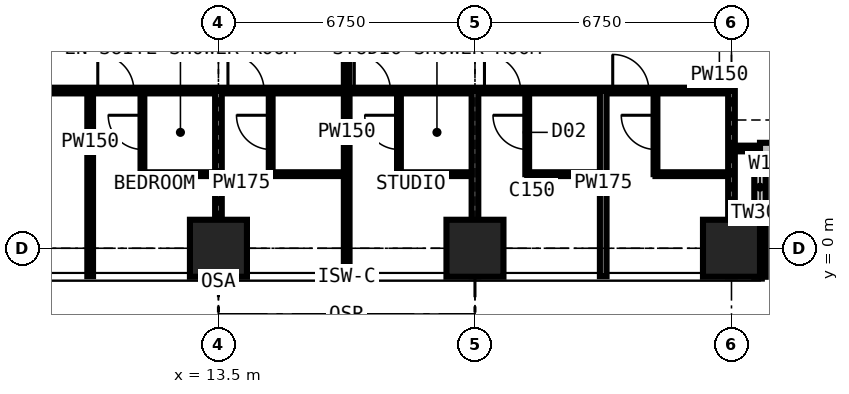
"""IFC4 building model, lengths in metres.
Left out: names, types, materials, properties, quantities, classifications, styles, units other than length and angle.
Written with IfcOpenShell. Run it as: python <this file> out.ifc"""

import sys

from ifc_helpers import new_model, si_unit, direction, frame, frame_2d, origin, origin_2d, place, context, subcontext, project, spatial, rectangle, extrude, element, fill, save


model = new_model("IFC4")
c1 = context("Model", 3, precision=1e-05, world=origin(), true_north=direction((0.0, 1.0)))
c2 = subcontext(c1, "Body", "Model", "MODEL_VIEW")
j1 = project(units=[si_unit("LENGTHUNIT", "METRE"), si_unit("PLANEANGLEUNIT", "RADIAN")], contexts=[c1])
p1 = place(None, origin())
s1 = spatial("IfcSite", under=j1, at=p1, CompositionType="ELEMENT")
p2 = place(p1, origin())
s2 = spatial("IfcBuilding", under=s1, at=p2, CompositionType="ELEMENT")
p3 = place(p2, frame((0.0, 0.0, 160.2)))
s3 = spatial("IfcBuildingStorey", under=s2, at=p3, CompositionType="ELEMENT", Elevation=160.2)
for number, where, z_axis, x_axis in (
    (1, (13.5, 0.0, 0.0), (0.0, 0.0, 1.0), (1.0, 0.0, 0.0)),
    (2, (20.25, 0.0, 0.0), (0.0, 0.0, 1.0), (1.0, 0.0, 0.0)),
    (3, (27.0, 0.0, 0.0), (0.0, 0.0, 1.0), (1.0, 0.0, 0.0)),
):
    element("IfcColumn", number, at=place(p3, frame(where, z_axis=z_axis, x_axis=x_axis)), inside=s3, PredefinedType="COLUMN", context=c2, shape_type="SweptSolid", body=[
        extrude(rectangle(XDim=1.5, YDim=1.5, at=origin_2d()), origin(), (0.0, 0.0, 1.0), 3.6),
    ])
p4 = place(p3, frame((27.75, -0.75, 0.0), z_axis=(0.0, 0.0, 1.0), x_axis=(0.0, 1.0, 0.0)))
e4 = element("IfcWall", 4, at=p4, inside=s3, PredefinedType="SOLIDWALL", context=c2, shape_type="SweptSolid", body=[
    extrude(rectangle(XDim=3.375, YDim=0.3, at=frame_2d((1.688, 0.0))), origin(), (0.0, 0.0, 1.0), 3.375),
])
p5 = place(p4, frame((1.607, 0.0, 0.9)))
e5 = element("IfcOpeningElement", 5, at=p5, cuts=e4, PredefinedType="OPENING", context=c2, shape_type="SweptSolid", body=[
    extrude(rectangle(XDim=1.5, YDim=1.8, at=frame_2d((0.75, 0.9))), frame((0.0, 0.16, 0.0), z_axis=(0.0, -1.0, 0.0), x_axis=(1.0, 0.0, 0.0)), (0.0, 0.0, 1.0), 0.32),
])
p6 = place(p3, frame((27.75, 2.625, 0.0), z_axis=(0.0, 0.0, 1.0), x_axis=(1.0, 0.0, 0.0)))
e6 = element("IfcWall", 6, at=p6, inside=s3, PredefinedType="SOLIDWALL", context=c2, shape_type="SweptSolid", body=[
    extrude(rectangle(XDim=3.375, YDim=0.3, at=frame_2d((1.688, 0.0))), origin(), (0.0, 0.0, 1.0), 3.375),
])
p7 = place(p6, frame((0.788, 0.0, 0.6)))
e7 = element("IfcOpeningElement", 7, at=p7, cuts=e6, PredefinedType="OPENING", context=c2, shape_type="SweptSolid", body=[
    extrude(rectangle(XDim=1.8, YDim=2.1, at=frame_2d((0.9, 1.05))), frame((0.0, 0.16, 0.0), z_axis=(0.0, -1.0, 0.0), x_axis=(1.0, 0.0, 0.0)), (0.0, 0.0, 1.0), 0.32),
])
p8 = place(p3, frame((6.75, 4.15, 0.0), z_axis=(0.0, 0.0, 1.0), x_axis=(1.0, 0.0, 0.0)))
e8 = element("IfcWall", 8, at=p8, inside=s3, PredefinedType="PARTITIONING", context=c2, shape_type="SweptSolid", body=[
    extrude(rectangle(XDim=20.25, YDim=0.15, at=frame_2d((10.125, 0.0))), origin(), (0.0, 0.0, 1.0), 3.375),
])
p9 = place(p8, frame((1.2, 0.0, 0.0)))
e9 = element("IfcOpeningElement", 9, at=p9, cuts=e8, PredefinedType="OPENING", context=c2, shape_type="SweptSolid", body=[
    extrude(rectangle(XDim=1.0, YDim=2.2, at=frame_2d((0.5, 1.1))), frame((0.0, 0.085, 0.0), z_axis=(0.0, -1.0, 0.0), x_axis=(1.0, 0.0, 0.0)), (0.0, 0.0, 1.0), 0.17),
])
p10 = place(p8, frame((3.575, 0.0, 0.0)))
e10 = element("IfcOpeningElement", 10, at=p10, cuts=e8, PredefinedType="OPENING", context=c2, shape_type="SweptSolid", body=[
    extrude(rectangle(XDim=0.95, YDim=2.2, at=frame_2d((0.475, 1.1))), frame((0.0, 0.085, 0.0), z_axis=(0.0, -1.0, 0.0), x_axis=(1.0, 0.0, 0.0)), (0.0, 0.0, 1.0), 0.17),
])
p11 = place(p8, frame((7.0, 0.0, 0.0)))
e11 = element("IfcOpeningElement", 11, at=p11, cuts=e8, PredefinedType="OPENING", context=c2, shape_type="SweptSolid", body=[
    extrude(rectangle(XDim=0.95, YDim=2.2, at=frame_2d((0.475, 1.1))), frame((0.0, 0.085, 0.0), z_axis=(0.0, -1.0, 0.0), x_axis=(1.0, 0.0, 0.0)), (0.0, 0.0, 1.0), 0.17),
])
p12 = place(p8, frame((10.325, 0.0, 0.0)))
e12 = element("IfcOpeningElement", 12, at=p12, cuts=e8, PredefinedType="OPENING", context=c2, shape_type="SweptSolid", body=[
    extrude(rectangle(XDim=0.95, YDim=2.2, at=frame_2d((0.475, 1.1))), frame((0.0, 0.085, 0.0), z_axis=(0.0, -1.0, 0.0), x_axis=(1.0, 0.0, 0.0)), (0.0, 0.0, 1.0), 0.17),
])
p13 = place(p8, frame((13.75, 0.0, 0.0)))
e13 = element("IfcOpeningElement", 13, at=p13, cuts=e8, PredefinedType="OPENING", context=c2, shape_type="SweptSolid", body=[
    extrude(rectangle(XDim=0.95, YDim=2.2, at=frame_2d((0.475, 1.1))), frame((0.0, 0.085, 0.0), z_axis=(0.0, -1.0, 0.0), x_axis=(1.0, 0.0, 0.0)), (0.0, 0.0, 1.0), 0.17),
])
p14 = place(p8, frame((17.125, 0.0, 0.0)))
e14 = element("IfcOpeningElement", 14, at=p14, cuts=e8, PredefinedType="OPENING", context=c2, shape_type="SweptSolid", body=[
    extrude(rectangle(XDim=0.95, YDim=2.2, at=frame_2d((0.475, 1.1))), frame((0.0, 0.085, 0.0), z_axis=(0.0, -1.0, 0.0), x_axis=(1.0, 0.0, 0.0)), (0.0, 0.0, 1.0), 0.17),
])
p15 = place(p3, frame((10.125, -0.734, 0.0), z_axis=(0.0, 0.0, 1.0), x_axis=(0.0, 1.0, 0.0)))
e15 = element("IfcWall", 15, at=p15, inside=s3, PredefinedType="PARTITIONING", context=c2, shape_type="SweptSolid", body=[
    extrude(rectangle(XDim=4.884, YDim=0.15, at=frame_2d((2.442, 0.0))), origin(), (0.0, 0.0, 1.0), 3.375),
])
p16 = place(p3, frame((11.5, 1.95, 0.0), z_axis=(0.0, 0.0, 1.0), x_axis=(0.0, 1.0, 0.0)))
e16 = element("IfcWall", 16, at=p16, inside=s3, PredefinedType="PARTITIONING", context=c2, shape_type="SweptSolid", body=[
    extrude(rectangle(XDim=2.2, YDim=0.1, at=frame_2d((1.1, 0.0))), origin(), (0.0, 0.0, 1.0), 3.375),
])
p17 = place(p16, frame((0.65, 0.0, 0.0)))
e17 = element("IfcOpeningElement", 17, at=p17, cuts=e16, PredefinedType="OPENING", context=c2, shape_type="SweptSolid", body=[
    extrude(rectangle(XDim=0.9, YDim=2.2, at=frame_2d((0.45, 1.1))), frame((0.0, 0.06, 0.0), z_axis=(0.0, -1.0, 0.0), x_axis=(1.0, 0.0, 0.0)), (0.0, 0.0, 1.0), 0.12),
])
p18 = place(p3, frame((11.5, 1.95, 0.0), z_axis=(0.0, 0.0, 1.0), x_axis=(1.0, 0.0, 0.0)))
e18 = element("IfcWall", 18, at=p18, inside=s3, PredefinedType="PARTITIONING", context=c2, shape_type="SweptSolid", body=[
    extrude(rectangle(XDim=2.0, YDim=0.1, at=frame_2d((1.0, 0.0))), origin(), (0.0, 0.0, 1.0), 3.375),
])
p19 = place(p3, frame((13.5, -0.734, 0.0), z_axis=(0.0, 0.0, 1.0), x_axis=(0.0, 1.0, 0.0)))
e19 = element("IfcWall", 19, at=p19, inside=s3, PredefinedType="PARTITIONING", context=c2, shape_type="SweptSolid", body=[
    extrude(rectangle(XDim=4.884, YDim=0.175, at=frame_2d((2.442, 0.0))), origin(), (0.0, 0.0, 1.0), 2.61),
])
p20 = place(p3, frame((14.875, 1.95, 0.0), z_axis=(0.0, 0.0, 1.0), x_axis=(0.0, 1.0, 0.0)))
e20 = element("IfcWall", 20, at=p20, inside=s3, PredefinedType="PARTITIONING", context=c2, shape_type="SweptSolid", body=[
    extrude(rectangle(XDim=2.2, YDim=0.1, at=frame_2d((1.1, 0.0))), origin(), (0.0, 0.0, 1.0), 3.375),
])
p21 = place(p20, frame((0.65, 0.0, 0.0)))
e21 = element("IfcOpeningElement", 21, at=p21, cuts=e20, PredefinedType="OPENING", context=c2, shape_type="SweptSolid", body=[
    extrude(rectangle(XDim=0.9, YDim=2.2, at=frame_2d((0.45, 1.1))), frame((0.0, 0.06, 0.0), z_axis=(0.0, -1.0, 0.0), x_axis=(1.0, 0.0, 0.0)), (0.0, 0.0, 1.0), 0.12),
])
p22 = place(p3, frame((14.875, 1.95, 0.0), z_axis=(0.0, 0.0, 1.0), x_axis=(1.0, 0.0, 0.0)))
e22 = element("IfcWall", 22, at=p22, inside=s3, PredefinedType="PARTITIONING", context=c2, shape_type="SweptSolid", body=[
    extrude(rectangle(XDim=2.0, YDim=0.1, at=frame_2d((1.0, 0.0))), origin(), (0.0, 0.0, 1.0), 3.375),
])
p23 = place(p3, frame((16.875, -0.734, 0.0), z_axis=(0.0, 0.0, 1.0), x_axis=(0.0, 1.0, 0.0)))
e23 = element("IfcWall", 23, at=p23, inside=s3, PredefinedType="PARTITIONING", context=c2, shape_type="SweptSolid", body=[
    extrude(rectangle(XDim=12.034, YDim=0.15, at=frame_2d((6.017, 0.0))), origin(), (0.0, 0.0, 1.0), 3.375),
])
p24 = place(p3, frame((18.25, 1.95, 0.0), z_axis=(0.0, 0.0, 1.0), x_axis=(0.0, 1.0, 0.0)))
e24 = element("IfcWall", 24, at=p24, inside=s3, PredefinedType="PARTITIONING", context=c2, shape_type="SweptSolid", body=[
    extrude(rectangle(XDim=2.2, YDim=0.1, at=frame_2d((1.1, 0.0))), origin(), (0.0, 0.0, 1.0), 3.375),
])
p25 = place(p24, frame((0.65, 0.0, 0.0)))
e25 = element("IfcOpeningElement", 25, at=p25, cuts=e24, PredefinedType="OPENING", context=c2, shape_type="SweptSolid", body=[
    extrude(rectangle(XDim=0.9, YDim=2.2, at=frame_2d((0.45, 1.1))), frame((0.0, 0.06, 0.0), z_axis=(0.0, -1.0, 0.0), x_axis=(1.0, 0.0, 0.0)), (0.0, 0.0, 1.0), 0.12),
])
p26 = place(p3, frame((18.25, 1.95, 0.0), z_axis=(0.0, 0.0, 1.0), x_axis=(1.0, 0.0, 0.0)))
e26 = element("IfcWall", 26, at=p26, inside=s3, PredefinedType="PARTITIONING", context=c2, shape_type="SweptSolid", body=[
    extrude(rectangle(XDim=2.0, YDim=0.1, at=frame_2d((1.0, 0.0))), origin(), (0.0, 0.0, 1.0), 3.375),
])
p27 = place(p3, frame((20.25, -0.734, 0.0), z_axis=(0.0, 0.0, 1.0), x_axis=(0.0, 1.0, 0.0)))
e27 = element("IfcWall", 27, at=p27, inside=s3, PredefinedType="PARTITIONING", context=c2, shape_type="SweptSolid", body=[
    extrude(rectangle(XDim=4.884, YDim=0.175, at=frame_2d((2.442, 0.0))), origin(), (0.0, 0.0, 1.0), 2.61),
])
p28 = place(p3, frame((21.625, 1.95, 0.0), z_axis=(0.0, 0.0, 1.0), x_axis=(0.0, 1.0, 0.0)))
e28 = element("IfcWall", 28, at=p28, inside=s3, PredefinedType="PARTITIONING", context=c2, shape_type="SweptSolid", body=[
    extrude(rectangle(XDim=2.2, YDim=0.1, at=frame_2d((1.1, 0.0))), origin(), (0.0, 0.0, 1.0), 3.375),
])
p29 = place(p28, frame((0.65, 0.0, 0.0)))
e29 = element("IfcOpeningElement", 29, at=p29, cuts=e28, PredefinedType="OPENING", context=c2, shape_type="SweptSolid", body=[
    extrude(rectangle(XDim=0.9, YDim=2.2, at=frame_2d((0.45, 1.1))), frame((0.0, 0.06, 0.0), z_axis=(0.0, -1.0, 0.0), x_axis=(1.0, 0.0, 0.0)), (0.0, 0.0, 1.0), 0.12),
])
p30 = place(p3, frame((21.625, 1.95, 0.0), z_axis=(0.0, 0.0, 1.0), x_axis=(1.0, 0.0, 0.0)))
e30 = element("IfcWall", 30, at=p30, inside=s3, PredefinedType="PARTITIONING", context=c2, shape_type="SweptSolid", body=[
    extrude(rectangle(XDim=2.0, YDim=0.1, at=frame_2d((1.0, 0.0))), origin(), (0.0, 0.0, 1.0), 3.375),
])
p31 = place(p3, frame((23.625, -0.734, 0.0), z_axis=(0.0, 0.0, 1.0), x_axis=(0.0, 1.0, 0.0)))
e31 = element("IfcWall", 31, at=p31, inside=s3, PredefinedType="PARTITIONING", context=c2, shape_type="SweptSolid", body=[
    extrude(rectangle(XDim=4.884, YDim=0.175, at=frame_2d((2.442, 0.0))), origin(), (0.0, 0.0, 1.0), 3.375),
])
p32 = place(p3, frame((25.0, 1.95, 0.0), z_axis=(0.0, 0.0, 1.0), x_axis=(0.0, 1.0, 0.0)))
e32 = element("IfcWall", 32, at=p32, inside=s3, PredefinedType="PARTITIONING", context=c2, shape_type="SweptSolid", body=[
    extrude(rectangle(XDim=2.2, YDim=0.1, at=frame_2d((1.1, 0.0))), origin(), (0.0, 0.0, 1.0), 3.375),
])
p33 = place(p32, frame((0.65, 0.0, 0.0)))
e33 = element("IfcOpeningElement", 33, at=p33, cuts=e32, PredefinedType="OPENING", context=c2, shape_type="SweptSolid", body=[
    extrude(rectangle(XDim=0.9, YDim=2.2, at=frame_2d((0.45, 1.1))), frame((0.0, 0.06, 0.0), z_axis=(0.0, -1.0, 0.0), x_axis=(1.0, 0.0, 0.0)), (0.0, 0.0, 1.0), 0.12),
])
p34 = place(p3, frame((25.0, 1.95, 0.0), z_axis=(0.0, 0.0, 1.0), x_axis=(1.0, 0.0, 0.0)))
e34 = element("IfcWall", 34, at=p34, inside=s3, PredefinedType="PARTITIONING", context=c2, shape_type="SweptSolid", body=[
    extrude(rectangle(XDim=2.0, YDim=0.1, at=frame_2d((1.0, 0.0))), origin(), (0.0, 0.0, 1.0), 3.375),
])
p35 = place(p3, frame((27.0, -0.734, 0.0), z_axis=(0.0, 0.0, 1.0), x_axis=(0.0, 1.0, 0.0)))
e35 = element("IfcWall", 35, at=p35, inside=s3, PredefinedType="PARTITIONING", context=c2, shape_type="SweptSolid", body=[
    extrude(rectangle(XDim=4.884, YDim=0.175, at=frame_2d((2.442, 0.0))), origin(), (0.0, 0.0, 1.0), 2.877),
])
p36 = place(p3, frame((27.0, 2.625, 0.0), z_axis=(0.0, 0.0, 1.0), x_axis=(1.0, 0.0, 0.0)))
e36 = element("IfcWall", 36, at=p36, inside=s3, PredefinedType="PARTITIONING", context=c2, shape_type="SweptSolid", body=[
    extrude(rectangle(XDim=0.734, YDim=0.15, at=frame_2d((0.367, 0.0))), origin(), (0.0, 0.0, 1.0), 3.375),
])
p37 = place(p5, origin())
e37 = element("IfcWindow", 37, at=p37, inside=s3, PartitioningType="SINGLE_PANEL", PredefinedType="WINDOW", context=c2, shape_type="SweptSolid", body=[
    extrude(rectangle(XDim=1.5, YDim=1.8, at=frame_2d((0.75, 0.9))), frame((0.0, 0.03, 0.0), z_axis=(0.0, -1.0, 0.0), x_axis=(1.0, 0.0, 0.0)), (0.0, 0.0, 1.0), 0.06),
])
fill(e5, e37)
p38 = place(p10, origin())
e38 = element("IfcDoor", 38, at=p38, inside=s3, OperationType="SINGLE_SWING_LEFT", PredefinedType="DOOR", context=c2, shape_type="SweptSolid", body=[
    extrude(rectangle(XDim=0.95, YDim=2.2, at=frame_2d((0.475, 1.1))), frame((0.0, 0.025, 0.0), z_axis=(0.0, -1.0, 0.0), x_axis=(1.0, 0.0, 0.0)), (0.0, 0.0, 1.0), 0.05),
])
fill(e10, e38)
p39 = place(p17, origin())
e39 = element("IfcDoor", 39, at=p39, inside=s3, OperationType="SINGLE_SWING_RIGHT", PredefinedType="DOOR", context=c2, shape_type="SweptSolid", body=[
    extrude(rectangle(XDim=0.9, YDim=2.2, at=frame_2d((0.45, 1.1))), frame((0.0, 0.025, 0.0), z_axis=(0.0, -1.0, 0.0), x_axis=(1.0, 0.0, 0.0)), (0.0, 0.0, 1.0), 0.05),
])
fill(e17, e39)
p40 = place(p11, origin())
e40 = element("IfcDoor", 40, at=p40, inside=s3, OperationType="SINGLE_SWING_LEFT", PredefinedType="DOOR", context=c2, shape_type="SweptSolid", body=[
    extrude(rectangle(XDim=0.95, YDim=2.2, at=frame_2d((0.475, 1.1))), frame((0.0, 0.025, 0.0), z_axis=(0.0, -1.0, 0.0), x_axis=(1.0, 0.0, 0.0)), (0.0, 0.0, 1.0), 0.05),
])
fill(e11, e40)
p41 = place(p21, origin())
e41 = element("IfcDoor", 41, at=p41, inside=s3, OperationType="SINGLE_SWING_RIGHT", PredefinedType="DOOR", context=c2, shape_type="SweptSolid", body=[
    extrude(rectangle(XDim=0.9, YDim=2.2, at=frame_2d((0.45, 1.1))), frame((0.0, 0.025, 0.0), z_axis=(0.0, -1.0, 0.0), x_axis=(1.0, 0.0, 0.0)), (0.0, 0.0, 1.0), 0.05),
])
fill(e21, e41)
p42 = place(p12, origin())
e42 = element("IfcDoor", 42, at=p42, inside=s3, OperationType="SINGLE_SWING_LEFT", PredefinedType="DOOR", context=c2, shape_type="SweptSolid", body=[
    extrude(rectangle(XDim=0.95, YDim=2.2, at=frame_2d((0.475, 1.1))), frame((0.0, 0.025, 0.0), z_axis=(0.0, -1.0, 0.0), x_axis=(1.0, 0.0, 0.0)), (0.0, 0.0, 1.0), 0.05),
])
fill(e12, e42)
p43 = place(p25, origin())
e43 = element("IfcDoor", 43, at=p43, inside=s3, OperationType="SINGLE_SWING_RIGHT", PredefinedType="DOOR", context=c2, shape_type="SweptSolid", body=[
    extrude(rectangle(XDim=0.9, YDim=2.2, at=frame_2d((0.45, 1.1))), frame((0.0, 0.025, 0.0), z_axis=(0.0, -1.0, 0.0), x_axis=(1.0, 0.0, 0.0)), (0.0, 0.0, 1.0), 0.05),
])
fill(e25, e43)
p44 = place(p13, origin())
e44 = element("IfcDoor", 44, at=p44, inside=s3, OperationType="SINGLE_SWING_LEFT", PredefinedType="DOOR", context=c2, shape_type="SweptSolid", body=[
    extrude(rectangle(XDim=0.95, YDim=2.2, at=frame_2d((0.475, 1.1))), frame((0.0, 0.025, 0.0), z_axis=(0.0, -1.0, 0.0), x_axis=(1.0, 0.0, 0.0)), (0.0, 0.0, 1.0), 0.05),
])
fill(e13, e44)
p45 = place(p29, origin())
e45 = element("IfcDoor", 45, at=p45, inside=s3, OperationType="SINGLE_SWING_RIGHT", PredefinedType="DOOR", context=c2, shape_type="SweptSolid", body=[
    extrude(rectangle(XDim=0.9, YDim=2.2, at=frame_2d((0.45, 1.1))), frame((0.0, 0.025, 0.0), z_axis=(0.0, -1.0, 0.0), x_axis=(1.0, 0.0, 0.0)), (0.0, 0.0, 1.0), 0.05),
])
fill(e29, e45)
p46 = place(p14, origin())
e46 = element("IfcDoor", 46, at=p46, inside=s3, OperationType="SINGLE_SWING_LEFT", PredefinedType="DOOR", context=c2, shape_type="SweptSolid", body=[
    extrude(rectangle(XDim=0.95, YDim=2.2, at=frame_2d((0.475, 1.1))), frame((0.0, 0.025, 0.0), z_axis=(0.0, -1.0, 0.0), x_axis=(1.0, 0.0, 0.0)), (0.0, 0.0, 1.0), 0.05),
])
fill(e14, e46)
p47 = place(p33, origin())
e47 = element("IfcDoor", 47, at=p47, inside=s3, OperationType="SINGLE_SWING_RIGHT", PredefinedType="DOOR", context=c2, shape_type="SweptSolid", body=[
    extrude(rectangle(XDim=0.9, YDim=2.2, at=frame_2d((0.45, 1.1))), frame((0.0, 0.025, 0.0), z_axis=(0.0, -1.0, 0.0), x_axis=(1.0, 0.0, 0.0)), (0.0, 0.0, 1.0), 0.05),
])
fill(e33, e47)
save(model, sys.argv[1])
